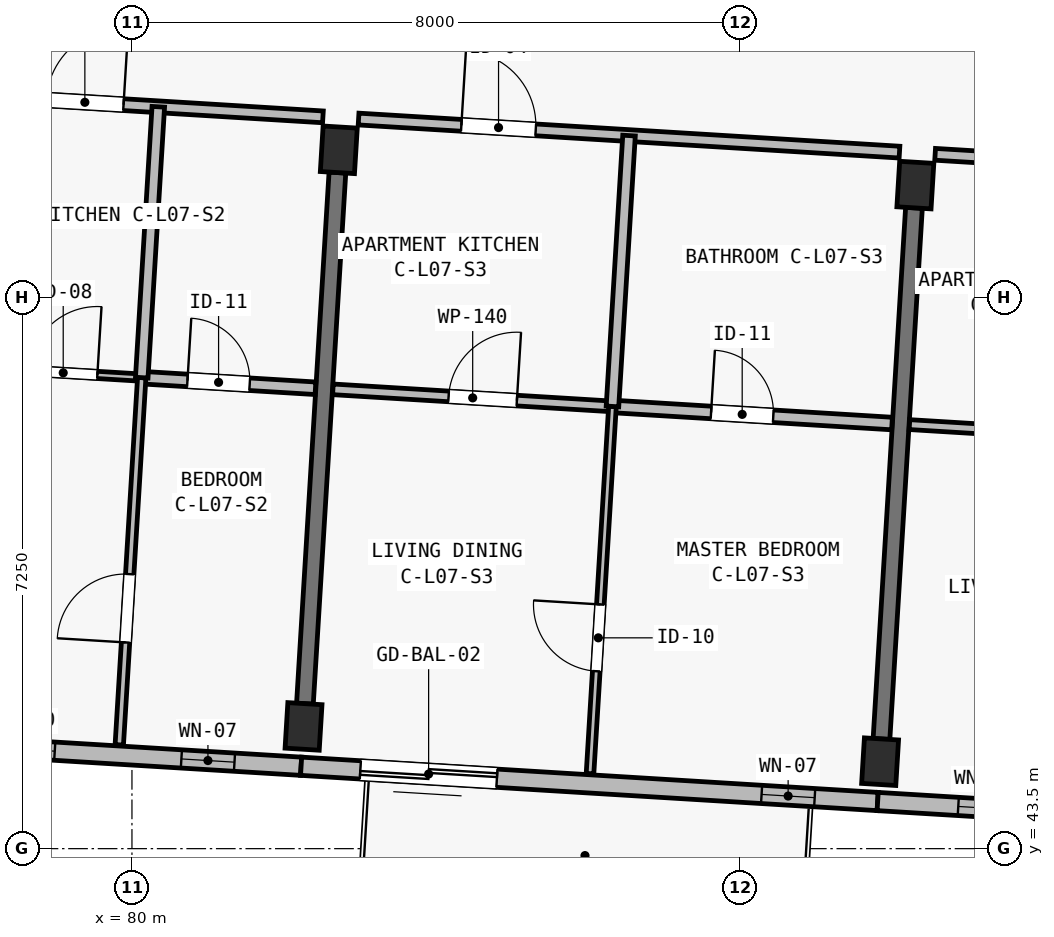
"""IFC4 building model, lengths in metres.
Left out: names, types, materials, properties, quantities, classifications, styles, units other than length and angle.
Written with IfcOpenShell. Run it as: python <this file> out.ifc"""

import sys

from ifc_helpers import new_model, si_unit, direction, frame, frame_2d, origin, origin_2d, place, context, subcontext, project, spatial, rectangle, extrude, element, fill, save


model = new_model("IFC4")
c1 = context("Model", 3, precision=1e-05, world=origin(), true_north=direction((0.0, 1.0)))
c2 = subcontext(c1, "Body", "Model", "MODEL_VIEW")
j1 = project(units=[si_unit("LENGTHUNIT", "METRE"), si_unit("PLANEANGLEUNIT", "RADIAN")], contexts=[c1])
p1 = place(None, origin())
s1 = spatial("IfcSite", under=j1, at=p1, CompositionType="ELEMENT")
p2 = place(p1, origin())
s2 = spatial("IfcBuilding", under=s1, at=p2, CompositionType="ELEMENT")
p3 = place(p2, frame((0.0, 0.0, 24.65)))
s3 = spatial("IfcBuildingStorey", under=s2, at=p3, CompositionType="ELEMENT", Elevation=24.65)
for number, where, z_axis, x_axis in (
    (1, (82.258, 45.108, 0.0), (0.0, 0.0, 1.0), (0.998, -0.061, 0.0)),
    (2, (82.721, 52.694, 0.0), (0.0, 0.0, 1.0), (0.998, -0.061, 0.0)),
    (3, (89.843, 44.644, 0.0), (0.0, 0.0, 1.0), (0.998, -0.061, 0.0)),
    (4, (90.307, 52.23, 0.0), (0.0, 0.0, 1.0), (0.998, -0.061, 0.0)),
):
    element("IfcColumn", number, at=place(p3, frame(where, z_axis=z_axis, x_axis=x_axis)), inside=s3, PredefinedType="COLUMN", context=c2, shape_type="SweptSolid", body=[
        extrude(rectangle(XDim=0.45, YDim=0.6, at=origin_2d()), origin(), (0.0, 0.0, 1.0), 3.25),
    ])
for number, where, z_axis, x_axis in (
    (5, (82.276, 45.407, 0.0), (0.0, 0.0, 1.0), (0.061, 0.998, 0.0)),
    (6, (89.862, 44.944, 0.0), (0.0, 0.0, 1.0), (0.061, 0.998, 0.0)),
):
    element("IfcWall", number, at=place(p3, frame(where, z_axis=z_axis, x_axis=x_axis)), inside=s3, PredefinedType="SHEAR", context=c2, shape_type="SweptSolid", body=[
        extrude(rectangle(XDim=7.0, YDim=0.22, at=frame_2d((3.5, 0.0))), origin(), (0.0, 0.0, 1.0), 2.5),
    ])
p4 = place(p3, frame((82.225, 44.584, 0.0), z_axis=(0.0, 0.0, 1.0), x_axis=(-0.998133591969, 0.061068261669, 0.0)))
e7 = element("IfcWall", 7, at=p4, inside=s3, PredefinedType="SOLIDWALL", context=c2, shape_type="SweptSolid", body=[
    extrude(rectangle(XDim=7.6, YDim=0.24, at=frame_2d((3.8, 0.0))), origin(), (0.0, 0.0, 1.0), 3.0),
])
p5 = place(p4, frame((0.878, 0.0, 0.42)))
e8 = element("IfcOpeningElement", 8, at=p5, cuts=e7, PredefinedType="OPENING", context=c2, shape_type="SweptSolid", body=[
    extrude(rectangle(XDim=0.7, YDim=2.36, at=frame_2d((0.35, 1.18))), frame((0.0, 0.135, 0.0), z_axis=(0.0, -1.0, 0.0), x_axis=(1.0, 0.0, 0.0)), (0.0, 0.0, 1.0), 0.27),
])
p6 = place(p4, frame((3.247, 0.0, 0.42)))
e9 = element("IfcOpeningElement", 9, at=p6, cuts=e7, PredefinedType="OPENING", context=c2, shape_type="SweptSolid", body=[
    extrude(rectangle(XDim=0.76, YDim=2.34, at=frame_2d((0.38, 1.17))), frame((0.0, 0.135, 0.0), z_axis=(0.0, -1.0, 0.0), x_axis=(1.0, 0.0, 0.0)), (0.0, 0.0, 1.0), 0.27),
])
p7 = place(p3, frame((89.811, 44.12, 0.0), z_axis=(0.0, 0.0, 1.0), x_axis=(-0.998135669243, 0.061034300063, 0.0)))
e10 = element("IfcWall", 10, at=p7, inside=s3, PredefinedType="SOLIDWALL", context=c2, shape_type="SweptSolid", body=[
    extrude(rectangle(XDim=7.6, YDim=0.24, at=frame_2d((3.8, 0.0))), origin(), (0.0, 0.0, 1.0), 3.0),
])
p8 = place(p7, frame((5.019, 0.0, 0.0)))
e11 = element("IfcOpeningElement", 11, at=p8, cuts=e10, PredefinedType="OPENING", context=c2, shape_type="SweptSolid", body=[
    extrude(rectangle(XDim=1.8, YDim=2.12, at=frame_2d((0.9, 1.06))), frame((0.0, 0.135, 0.0), z_axis=(0.0, -1.0, 0.0), x_axis=(1.0, 0.0, 0.0)), (0.0, 0.0, 1.0), 0.27),
])
p9 = place(p7, frame((0.83, 0.0, 0.46)))
e12 = element("IfcOpeningElement", 12, at=p9, cuts=e10, PredefinedType="OPENING", context=c2, shape_type="SweptSolid", body=[
    extrude(rectangle(XDim=0.7, YDim=2.36, at=frame_2d((0.35, 1.18))), frame((0.0, 0.135, 0.0), z_axis=(0.0, -1.0, 0.0), x_axis=(1.0, 0.0, 0.0)), (0.0, 0.0, 1.0), 0.27),
])
p10 = place(p3, frame((97.397, 43.656, 0.0), z_axis=(0.0, 0.0, 1.0), x_axis=(-0.998135549572, 0.061036257095, 0.0)))
e13 = element("IfcWall", 13, at=p10, inside=s3, PredefinedType="SOLIDWALL", context=c2, shape_type="SweptSolid", body=[
    extrude(rectangle(XDim=7.6, YDim=0.24, at=frame_2d((3.8, 0.0))), origin(), (0.0, 0.0, 1.0), 3.0),
])
p11 = place(p10, frame((0.61, 0.0, 0.52)))
e14 = element("IfcOpeningElement", 14, at=p11, cuts=e13, PredefinedType="OPENING", context=c2, shape_type="SweptSolid", body=[
    extrude(rectangle(XDim=0.6, YDim=2.22, at=frame_2d((0.3, 1.11))), frame((0.0, 0.135, 0.0), z_axis=(0.0, -1.0, 0.0), x_axis=(1.0, 0.0, 0.0)), (0.0, 0.0, 1.0), 0.27),
])
p12 = place(p10, frame((2.132, 0.0, 0.42)))
e15 = element("IfcOpeningElement", 15, at=p12, cuts=e13, PredefinedType="OPENING", context=c2, shape_type="SweptSolid", body=[
    extrude(rectangle(XDim=0.62, YDim=2.28, at=frame_2d((0.31, 1.14))), frame((0.0, 0.135, 0.0), z_axis=(0.0, -1.0, 0.0), x_axis=(1.0, 0.0, 0.0)), (0.0, 0.0, 1.0), 0.27),
])
p13 = place(p10, frame((5.877, 0.0, 0.52)))
e16 = element("IfcOpeningElement", 16, at=p13, cuts=e13, PredefinedType="OPENING", context=c2, shape_type="SweptSolid", body=[
    extrude(rectangle(XDim=0.66, YDim=2.32, at=frame_2d((0.33, 1.16))), frame((0.0, 0.135, 0.0), z_axis=(0.0, -1.0, 0.0), x_axis=(1.0, 0.0, 0.0)), (0.0, 0.0, 1.0), 0.27),
])
p14 = place(p3, frame((78.415, 53.378, 0.0), z_axis=(0.0, 0.0, 1.0), x_axis=(0.998132736029, -0.061082250024, 0.0)))
e17 = element("IfcWall", 17, at=p14, inside=s3, PredefinedType="PARTITIONING", context=c2, shape_type="SweptSolid", body=[
    extrude(rectangle(XDim=4.105, YDim=0.155, at=frame_2d((2.052, 0.0))), origin(), (0.0, 0.0, 1.0), 2.97),
])
p15 = place(p14, frame((0.457, 0.0, 0.0)))
e18 = element("IfcOpeningElement", 18, at=p15, cuts=e17, PredefinedType="OPENING", context=c2, shape_type="SweptSolid", body=[
    extrude(rectangle(XDim=1.02, YDim=2.2, at=frame_2d((0.51, 1.1))), frame((0.0, 0.093, 0.0), z_axis=(0.0, -1.0, 0.0), x_axis=(1.0, 0.0, 0.0)), (0.0, 0.0, 1.0), 0.185),
])
p16 = place(p3, frame((75.058, 50.007, 0.0), z_axis=(0.0, 0.0, 1.0), x_axis=(0.998132708268, -0.061082703655, 0.0)))
e19 = element("IfcWall", 19, at=p16, inside=s3, PredefinedType="PARTITIONING", context=c2, shape_type="SweptSolid", body=[
    extrude(rectangle(XDim=5.08, YDim=0.095, at=frame_2d((2.54, 0.0))), origin(), (0.0, 0.0, 1.0), 2.97),
])
p17 = place(p16, frame((3.595, 0.0, 0.0)))
e20 = element("IfcOpeningElement", 20, at=p17, cuts=e19, PredefinedType="OPENING", context=c2, shape_type="SweptSolid", body=[
    extrude(rectangle(XDim=0.9, YDim=2.1, at=frame_2d((0.45, 1.05))), frame((0.0, 0.062, 0.0), z_axis=(0.0, -1.0, 0.0), x_axis=(1.0, 0.0, 0.0)), (0.0, 0.0, 1.0), 0.125),
])
p18 = place(p3, frame((80.129, 49.697, 0.0), z_axis=(0.0, 0.0, 1.0), x_axis=(0.998138723231, -0.060984335579, 0.0)))
e21 = element("IfcWall", 21, at=p18, inside=s3, PredefinedType="PLUMBINGWALL", context=c2, shape_type="SweptSolid", body=[
    extrude(rectangle(XDim=2.29, YDim=0.165, at=frame_2d((1.145, 0.0))), origin(), (0.0, 0.0, 1.0), 2.97),
])
p19 = place(p18, frame((0.603, 0.0, 0.0)))
e22 = element("IfcOpeningElement", 22, at=p19, cuts=e21, PredefinedType="OPENING", context=c2, shape_type="SweptSolid", body=[
    extrude(rectangle(XDim=0.82, YDim=2.08, at=frame_2d((0.41, 1.04))), frame((0.0, 0.097, 0.0), z_axis=(0.0, -1.0, 0.0), x_axis=(1.0, 0.0, 0.0)), (0.0, 0.0, 1.0), 0.195),
])
p20 = place(p3, frame((79.833, 44.866, 0.0), z_axis=(0.0, 0.0, 1.0), x_axis=(0.061037243745, 0.998135489238, 0.0)))
e23 = element("IfcWall", 23, at=p20, inside=s3, PredefinedType="PARTITIONING", context=c2, shape_type="SweptSolid", body=[
    extrude(rectangle(XDim=4.84, YDim=0.11, at=frame_2d((2.42, 0.0))), origin(), (0.0, 0.0, 1.0), 2.97),
])
p21 = place(p20, frame((1.35, 0.0, 0.0)))
e24 = element("IfcOpeningElement", 24, at=p21, cuts=e23, PredefinedType="OPENING", context=c2, shape_type="SweptSolid", body=[
    extrude(rectangle(XDim=0.9, YDim=2.1, at=frame_2d((0.45, 1.05))), frame((0.0, 0.07, 0.0), z_axis=(0.0, -1.0, 0.0), x_axis=(1.0, 0.0, 0.0)), (0.0, 0.0, 1.0), 0.14),
])
p22 = place(p3, frame((80.129, 49.697, 0.0), z_axis=(0.0, 0.0, 1.0), x_axis=(0.061066961405, 0.998133671521, 0.0)))
e25 = element("IfcWall", 25, at=p22, inside=s3, PredefinedType="PLUMBINGWALL", context=c2, shape_type="SweptSolid", body=[
    extrude(rectangle(XDim=3.57, YDim=0.165, at=frame_2d((1.785, 0.0))), origin(), (0.0, 0.0, 1.0), 2.97),
])
p23 = place(p3, frame((82.982, 53.099, 0.0), z_axis=(0.0, 0.0, 1.0), x_axis=(0.998134569689, -0.061052279168, 0.0)))
e26 = element("IfcWall", 26, at=p23, inside=s3, PredefinedType="PARTITIONING", context=c2, shape_type="SweptSolid", body=[
    extrude(rectangle(XDim=7.13, YDim=0.155, at=frame_2d((3.565, 0.0))), origin(), (0.0, 0.0, 1.0), 2.97),
])
p24 = place(p23, frame((1.355, 0.0, 0.0)))
e27 = element("IfcOpeningElement", 27, at=p24, cuts=e26, PredefinedType="OPENING", context=c2, shape_type="SweptSolid", body=[
    extrude(rectangle(XDim=0.98, YDim=2.15, at=frame_2d((0.49, 1.075))), frame((0.0, 0.093, 0.0), z_axis=(0.0, -1.0, 0.0), x_axis=(1.0, 0.0, 0.0)), (0.0, 0.0, 1.0), 0.185),
])
p25 = place(p3, frame((82.644, 49.543, 0.0), z_axis=(0.0, 0.0, 1.0), x_axis=(0.998136472989, -0.061021154439, 0.0)))
e28 = element("IfcWall", 28, at=p25, inside=s3, PredefinedType="PARTITIONING", context=c2, shape_type="SweptSolid", body=[
    extrude(rectangle(XDim=3.685, YDim=0.14, at=frame_2d((1.842, 0.0))), origin(), (0.0, 0.0, 1.0), 2.97),
])
p26 = place(p25, frame((1.525, 0.0, 0.0)))
e29 = element("IfcOpeningElement", 29, at=p26, cuts=e28, PredefinedType="OPENING", context=c2, shape_type="SweptSolid", body=[
    extrude(rectangle(XDim=0.9, YDim=2.1, at=frame_2d((0.45, 1.05))), frame((0.0, 0.085, 0.0), z_axis=(0.0, -1.0, 0.0), x_axis=(1.0, 0.0, 0.0)), (0.0, 0.0, 1.0), 0.17),
])
p27 = place(p3, frame((86.322, 49.318, 0.0), z_axis=(0.0, 0.0, 1.0), x_axis=(0.998132682596, -0.061083123148, 0.0)))
e30 = element("IfcWall", 30, at=p27, inside=s3, PredefinedType="PLUMBINGWALL", context=c2, shape_type="SweptSolid", body=[
    extrude(rectangle(XDim=3.685, YDim=0.165, at=frame_2d((1.843, 0.0))), origin(), (0.0, 0.0, 1.0), 2.97),
])
p28 = place(p27, frame((1.3, 0.0, 0.0)))
e31 = element("IfcOpeningElement", 31, at=p28, cuts=e30, PredefinedType="OPENING", context=c2, shape_type="SweptSolid", body=[
    extrude(rectangle(XDim=0.82, YDim=2.08, at=frame_2d((0.41, 1.04))), frame((0.0, 0.097, 0.0), z_axis=(0.0, -1.0, 0.0), x_axis=(1.0, 0.0, 0.0)), (0.0, 0.0, 1.0), 0.195),
])
p29 = place(p3, frame((86.027, 44.487, 0.0), z_axis=(0.0, 0.0, 1.0), x_axis=(0.061034170677, 0.998135677155, 0.0)))
e32 = element("IfcWall", 32, at=p29, inside=s3, PredefinedType="PARTITIONING", context=c2, shape_type="SweptSolid", body=[
    extrude(rectangle(XDim=4.84, YDim=0.1, at=frame_2d((2.42, 0.0))), origin(), (0.0, 0.0, 1.0), 2.97),
])
p30 = place(p29, frame((1.35, 0.0, 0.0)))
e33 = element("IfcOpeningElement", 33, at=p30, cuts=e32, PredefinedType="OPENING", context=c2, shape_type="SweptSolid", body=[
    extrude(rectangle(XDim=0.88, YDim=2.1, at=frame_2d((0.44, 1.05))), frame((0.0, 0.065, 0.0), z_axis=(0.0, -1.0, 0.0), x_axis=(1.0, 0.0, 0.0)), (0.0, 0.0, 1.0), 0.13),
])
p31 = place(p3, frame((86.322, 49.318, 0.0), z_axis=(0.0, 0.0, 1.0), x_axis=(0.061071129902, 0.998133416479, 0.0)))
e34 = element("IfcWall", 34, at=p31, inside=s3, PredefinedType="PLUMBINGWALL", context=c2, shape_type="SweptSolid", body=[
    extrude(rectangle(XDim=3.57, YDim=0.165, at=frame_2d((1.785, 0.0))), origin(), (0.0, 0.0, 1.0), 2.97),
])
p32 = place(p3, frame((90.567, 52.635, 0.0), z_axis=(0.0, 0.0, 1.0), x_axis=(0.998134569689, -0.061052279168, 0.0)))
e35 = element("IfcWall", 35, at=p32, inside=s3, PredefinedType="PARTITIONING", context=c2, shape_type="SweptSolid", body=[
    extrude(rectangle(XDim=7.13, YDim=0.155, at=frame_2d((3.565, 0.0))), origin(), (0.0, 0.0, 1.0), 2.97),
])
p33 = place(p32, frame((1.355, 0.0, 0.0)))
e36 = element("IfcOpeningElement", 36, at=p33, cuts=e35, PredefinedType="OPENING", context=c2, shape_type="SweptSolid", body=[
    extrude(rectangle(XDim=1.02, YDim=2.2, at=frame_2d((0.51, 1.1))), frame((0.0, 0.093, 0.0), z_axis=(0.0, -1.0, 0.0), x_axis=(1.0, 0.0, 0.0)), (0.0, 0.0, 1.0), 0.185),
])
p34 = place(p3, frame((90.23, 49.079, 0.0), z_axis=(0.0, 0.0, 1.0), x_axis=(0.998132682596, -0.061083123148, 0.0)))
e37 = element("IfcWall", 37, at=p34, inside=s3, PredefinedType="PARTITIONING", context=c2, shape_type="SweptSolid", body=[
    extrude(rectangle(XDim=3.685, YDim=0.13, at=frame_2d((1.843, 0.0))), origin(), (0.0, 0.0, 1.0), 2.97),
])
p35 = place(p34, frame((1.525, 0.0, 0.0)))
e38 = element("IfcOpeningElement", 38, at=p35, cuts=e37, PredefinedType="OPENING", context=c2, shape_type="SweptSolid", body=[
    extrude(rectangle(XDim=0.88, YDim=2.1, at=frame_2d((0.44, 1.05))), frame((0.0, 0.08, 0.0), z_axis=(0.0, -1.0, 0.0), x_axis=(1.0, 0.0, 0.0)), (0.0, 0.0, 1.0), 0.16),
])
p36 = place(p5, origin())
e39 = element("IfcWindow", 39, at=p36, inside=s3, PartitioningType="SINGLE_PANEL", PredefinedType="WINDOW", context=c2, shape_type="SweptSolid", body=[
    extrude(rectangle(XDim=0.7, YDim=2.36, at=frame_2d((0.35, 1.18))), frame((0.0, 0.03, 0.0), z_axis=(0.0, -1.0, 0.0), x_axis=(1.0, 0.0, 0.0)), (0.0, 0.0, 1.0), 0.06),
])
fill(e8, e39)
p37 = place(p6, origin())
e40 = element("IfcWindow", 40, at=p37, inside=s3, PartitioningType="SINGLE_PANEL", PredefinedType="WINDOW", context=c2, shape_type="SweptSolid", body=[
    extrude(rectangle(XDim=0.76, YDim=2.34, at=frame_2d((0.38, 1.17))), frame((0.0, 0.03, 0.0), z_axis=(0.0, -1.0, 0.0), x_axis=(1.0, 0.0, 0.0)), (0.0, 0.0, 1.0), 0.06),
])
fill(e9, e40)
p38 = place(p8, origin())
e41 = element("IfcDoor", 41, at=p38, inside=s3, OperationType="SLIDING_TO_LEFT", PredefinedType="DOOR", context=c2, shape_type="SweptSolid", body=[
    extrude(rectangle(XDim=1.8, YDim=2.12, at=frame_2d((0.9, 1.06))), frame((0.0, 0.025, 0.0), z_axis=(0.0, -1.0, 0.0), x_axis=(1.0, 0.0, 0.0)), (0.0, 0.0, 1.0), 0.05),
])
fill(e11, e41)
p39 = place(p9, origin())
e42 = element("IfcWindow", 42, at=p39, inside=s3, PartitioningType="SINGLE_PANEL", PredefinedType="WINDOW", context=c2, shape_type="SweptSolid", body=[
    extrude(rectangle(XDim=0.7, YDim=2.36, at=frame_2d((0.35, 1.18))), frame((0.0, 0.03, 0.0), z_axis=(0.0, -1.0, 0.0), x_axis=(1.0, 0.0, 0.0)), (0.0, 0.0, 1.0), 0.06),
])
fill(e12, e42)
p40 = place(p13, origin())
e43 = element("IfcWindow", 43, at=p40, inside=s3, PartitioningType="SINGLE_PANEL", PredefinedType="WINDOW", context=c2, shape_type="SweptSolid", body=[
    extrude(rectangle(XDim=0.66, YDim=2.32, at=frame_2d((0.33, 1.16))), frame((0.0, 0.03, 0.0), z_axis=(0.0, -1.0, 0.0), x_axis=(1.0, 0.0, 0.0)), (0.0, 0.0, 1.0), 0.06),
])
fill(e16, e43)
p41 = place(p15, origin())
e44 = element("IfcDoor", 44, at=p41, inside=s3, OperationType="SINGLE_SWING_RIGHT", PredefinedType="DOOR", context=c2, shape_type="SweptSolid", body=[
    extrude(rectangle(XDim=1.02, YDim=2.2, at=frame_2d((0.51, 1.1))), frame((0.0, 0.025, 0.0), z_axis=(0.0, -1.0, 0.0), x_axis=(1.0, 0.0, 0.0)), (0.0, 0.0, 1.0), 0.05),
])
fill(e18, e44)
p42 = place(p17, origin())
e45 = element("IfcDoor", 45, at=p42, inside=s3, OperationType="SINGLE_SWING_RIGHT", PredefinedType="DOOR", context=c2, shape_type="SweptSolid", body=[
    extrude(rectangle(XDim=0.9, YDim=2.1, at=frame_2d((0.45, 1.05))), frame((0.0, 0.025, 0.0), z_axis=(0.0, -1.0, 0.0), x_axis=(1.0, 0.0, 0.0)), (0.0, 0.0, 1.0), 0.05),
])
fill(e20, e45)
p43 = place(p19, origin())
e46 = element("IfcDoor", 46, at=p43, inside=s3, OperationType="SINGLE_SWING_LEFT", PredefinedType="DOOR", context=c2, shape_type="SweptSolid", body=[
    extrude(rectangle(XDim=0.82, YDim=2.08, at=frame_2d((0.41, 1.04))), frame((0.0, 0.025, 0.0), z_axis=(0.0, -1.0, 0.0), x_axis=(1.0, 0.0, 0.0)), (0.0, 0.0, 1.0), 0.05),
])
fill(e22, e46)
p44 = place(p21, origin())
e47 = element("IfcDoor", 47, at=p44, inside=s3, OperationType="SINGLE_SWING_LEFT", PredefinedType="DOOR", context=c2, shape_type="SweptSolid", body=[
    extrude(rectangle(XDim=0.9, YDim=2.1, at=frame_2d((0.45, 1.05))), frame((0.0, 0.025, 0.0), z_axis=(0.0, -1.0, 0.0), x_axis=(1.0, 0.0, 0.0)), (0.0, 0.0, 1.0), 0.05),
])
fill(e24, e47)
p45 = place(p24, origin())
e48 = element("IfcDoor", 48, at=p45, inside=s3, OperationType="SINGLE_SWING_LEFT", PredefinedType="DOOR", context=c2, shape_type="SweptSolid", body=[
    extrude(rectangle(XDim=0.98, YDim=2.15, at=frame_2d((0.49, 1.075))), frame((0.0, 0.025, 0.0), z_axis=(0.0, -1.0, 0.0), x_axis=(1.0, 0.0, 0.0)), (0.0, 0.0, 1.0), 0.05),
])
fill(e27, e48)
p46 = place(p26, origin())
e49 = element("IfcDoor", 49, at=p46, inside=s3, OperationType="SINGLE_SWING_RIGHT", PredefinedType="DOOR", context=c2, shape_type="SweptSolid", body=[
    extrude(rectangle(XDim=0.9, YDim=2.1, at=frame_2d((0.45, 1.05))), frame((0.0, 0.025, 0.0), z_axis=(0.0, -1.0, 0.0), x_axis=(1.0, 0.0, 0.0)), (0.0, 0.0, 1.0), 0.05),
])
fill(e29, e49)
p47 = place(p28, origin())
e50 = element("IfcDoor", 50, at=p47, inside=s3, OperationType="SINGLE_SWING_LEFT", PredefinedType="DOOR", context=c2, shape_type="SweptSolid", body=[
    extrude(rectangle(XDim=0.82, YDim=2.08, at=frame_2d((0.41, 1.04))), frame((0.0, 0.025, 0.0), z_axis=(0.0, -1.0, 0.0), x_axis=(1.0, 0.0, 0.0)), (0.0, 0.0, 1.0), 0.05),
])
fill(e31, e50)
p48 = place(p30, origin())
e51 = element("IfcDoor", 51, at=p48, inside=s3, OperationType="SINGLE_SWING_RIGHT", PredefinedType="DOOR", context=c2, shape_type="SweptSolid", body=[
    extrude(rectangle(XDim=0.88, YDim=2.1, at=frame_2d((0.44, 1.05))), frame((0.0, 0.025, 0.0), z_axis=(0.0, -1.0, 0.0), x_axis=(1.0, 0.0, 0.0)), (0.0, 0.0, 1.0), 0.05),
])
fill(e33, e51)
save(model, sys.argv[1])
